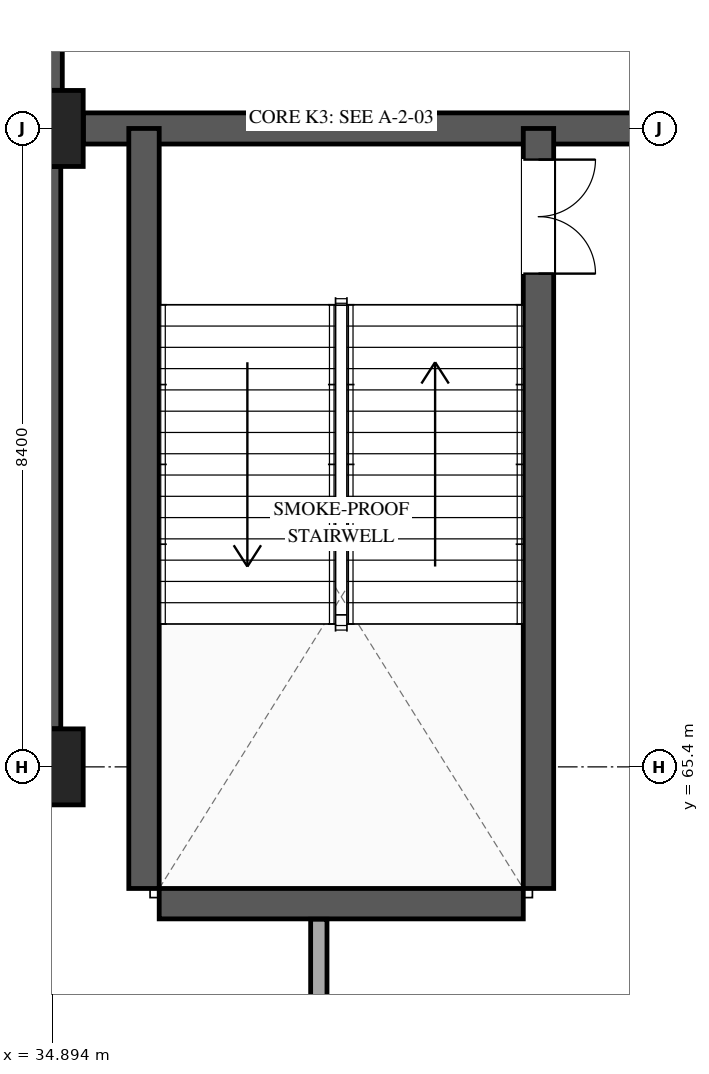
"""IFC4 building model, lengths in metres.
Left out: names, types, materials, properties, quantities, classifications, styles, units other than length and angle.
Written with IfcOpenShell. Run it as: python <this file> out.ifc"""

import sys

from ifc_helpers import new_model, si_unit, direction, frame, frame_2d, origin, origin_2d, place, context, subcontext, project, spatial, rectangle, extrude, element, fill, save


model = new_model("IFC4")
c1 = context("Model", 3, precision=1e-05, world=origin(), true_north=direction((0.0, 1.0)))
c2 = subcontext(c1, "Body", "Model", "MODEL_VIEW")
j1 = project(units=[si_unit("LENGTHUNIT", "METRE"), si_unit("PLANEANGLEUNIT", "RADIAN")], contexts=[c1])
p1 = place(None, origin())
s1 = spatial("IfcSite", under=j1, at=p1, CompositionType="ELEMENT")
p2 = place(p1, origin())
s2 = spatial("IfcBuilding", under=s1, at=p2, CompositionType="ELEMENT")
p3 = place(p2, frame((0.0, 0.0, -4.8)))
s3 = spatial("IfcBuildingStorey", under=s2, at=p3, CompositionType="ELEMENT", Elevation=-4.8)
for number, where, z_axis, x_axis in (
    (1, (34.8, 65.4, 0.0), (0.0, 0.0, 1.0), (1.0, 0.0, 0.0)),
    (2, (34.8, 73.8, 0.0), (0.0, 0.0, 1.0), (1.0, 0.0, 0.0)),
):
    element("IfcColumn", number, at=place(p3, frame(where, z_axis=z_axis, x_axis=x_axis)), inside=s3, PredefinedType="COLUMN", context=c2, shape_type="SweptSolid", body=[
        extrude(rectangle(XDim=1.0, YDim=1.0, at=origin_2d()), origin(), (0.0, 0.0, 1.0), 4.8),
    ])
p4 = place(p3, frame((34.8, 74.302, 0.0), z_axis=(0.0, 0.0, 1.0), x_axis=(0.0, 1.0, 0.0)))
e3 = element("IfcWall", 3, at=p4, inside=s3, PredefinedType="USERDEFINED", context=c2, shape_type="SweptSolid", body=[
    extrude(rectangle(XDim=7.446, YDim=0.45, at=frame_2d((3.723, 0.0))), origin(), (0.0, 0.0, 1.0), 4.58),
])
p5 = place(p3, frame((34.8, 65.902, 0.0), z_axis=(0.0, 0.0, 1.0), x_axis=(0.0, 1.0, 0.0)))
e4 = element("IfcWall", 4, at=p5, inside=s3, PredefinedType="USERDEFINED", context=c2, shape_type="SweptSolid", body=[
    extrude(rectangle(XDim=7.396, YDim=0.41, at=frame_2d((3.698, 0.0))), origin(), (0.0, 0.0, 1.0), 4.46),
])
p6 = place(p3, frame((35.302, 73.8, 0.0), z_axis=(0.0, 0.0, 1.0), x_axis=(1.0, 0.0, 0.0)))
e5 = element("IfcWall", 5, at=p6, inside=s3, PredefinedType="USERDEFINED", context=c2, shape_type="SweptSolid", body=[
    extrude(rectangle(XDim=7.696, YDim=0.41, at=frame_2d((3.848, 0.0))), origin(), (0.0, 0.0, 1.0), 4.46),
])
p7 = place(p3, frame((36.1, 63.8, 0.0), z_axis=(0.0, 0.0, 1.0), x_axis=(0.0, 1.0, 0.0)))
e6 = element("IfcWall", 6, at=p7, inside=s3, PredefinedType="SHEAR", context=c2, shape_type="SweptSolid", body=[
    extrude(rectangle(XDim=10.0, YDim=0.4, at=frame_2d((5.0, 0.0))), origin(), (0.0, 0.0, 1.0), 4.8),
])
p8 = place(p3, frame((41.29, 73.8, 0.0), z_axis=(0.0, 0.0, 1.0), x_axis=(0.0, -1.0, 0.0)))
e7 = element("IfcWall", 7, at=p8, inside=s3, PredefinedType="SHEAR", context=c2, shape_type="SweptSolid", body=[
    extrude(rectangle(XDim=10.0, YDim=0.4, at=frame_2d((5.0, 0.0))), origin(), (0.0, 0.0, 1.0), 4.8),
])
p9 = place(p8, frame((0.41, 0.0, 0.0)))
e8 = element("IfcOpeningElement", 8, at=p9, cuts=e7, PredefinedType="OPENING", context=c2, shape_type="SweptSolid", body=[
    extrude(rectangle(XDim=1.5, YDim=2.2, at=frame_2d((0.75, 1.1))), frame((0.0, 0.21, 0.0), z_axis=(0.0, -1.0, 0.0), x_axis=(1.0, 0.0, 0.0)), (0.0, 0.0, 1.0), 0.42),
])
p10 = place(p3, frame((41.09, 63.6, 0.0), z_axis=(0.0, 0.0, 1.0), x_axis=(-1.0, 0.0, 0.0)))
e9 = element("IfcWall", 9, at=p10, inside=s3, PredefinedType="SHEAR", context=c2, shape_type="SweptSolid", body=[
    extrude(rectangle(XDim=4.79, YDim=0.4, at=frame_2d((2.395, 0.0))), origin(), (0.0, 0.0, 1.0), 4.8),
])
p11 = place(p3, frame((38.4, 50.4, 0.0), z_axis=(0.0, 0.0, 1.0), x_axis=(0.0, 1.0, 0.0)))
e10 = element("IfcWall", 10, at=p11, inside=s3, PredefinedType="PARTITIONING", context=c2, shape_type="SweptSolid", body=[
    extrude(rectangle(XDim=12.995, YDim=0.215, at=frame_2d((6.498, 0.0))), origin(), (0.0, 0.0, 1.0), 3.65),
])
p12 = place(p11, frame((5.823, 0.0, 0.0)))
e11 = element("IfcOpeningElement", 11, at=p12, cuts=e10, PredefinedType="OPENING", context=c2, shape_type="SweptSolid", body=[
    extrude(rectangle(XDim=1.35, YDim=2.2, at=frame_2d((0.675, 1.1))), frame((0.0, 0.118, 0.0), z_axis=(0.0, -1.0, 0.0), x_axis=(1.0, 0.0, 0.0)), (0.0, 0.0, 1.0), 0.235),
])
p13 = place(p9, origin())
e12 = element("IfcDoor", 12, at=p13, inside=s3, OperationType="DOUBLE_DOOR_SINGLE_SWING", PredefinedType="DOOR", context=c2, shape_type="SweptSolid", body=[
    extrude(rectangle(XDim=1.5, YDim=2.2, at=frame_2d((0.75, 1.1))), frame((0.0, 0.025, 0.0), z_axis=(0.0, -1.0, 0.0), x_axis=(1.0, 0.0, 0.0)), (0.0, 0.0, 1.0), 0.05),
])
fill(e8, e12)
save(model, sys.argv[1])
